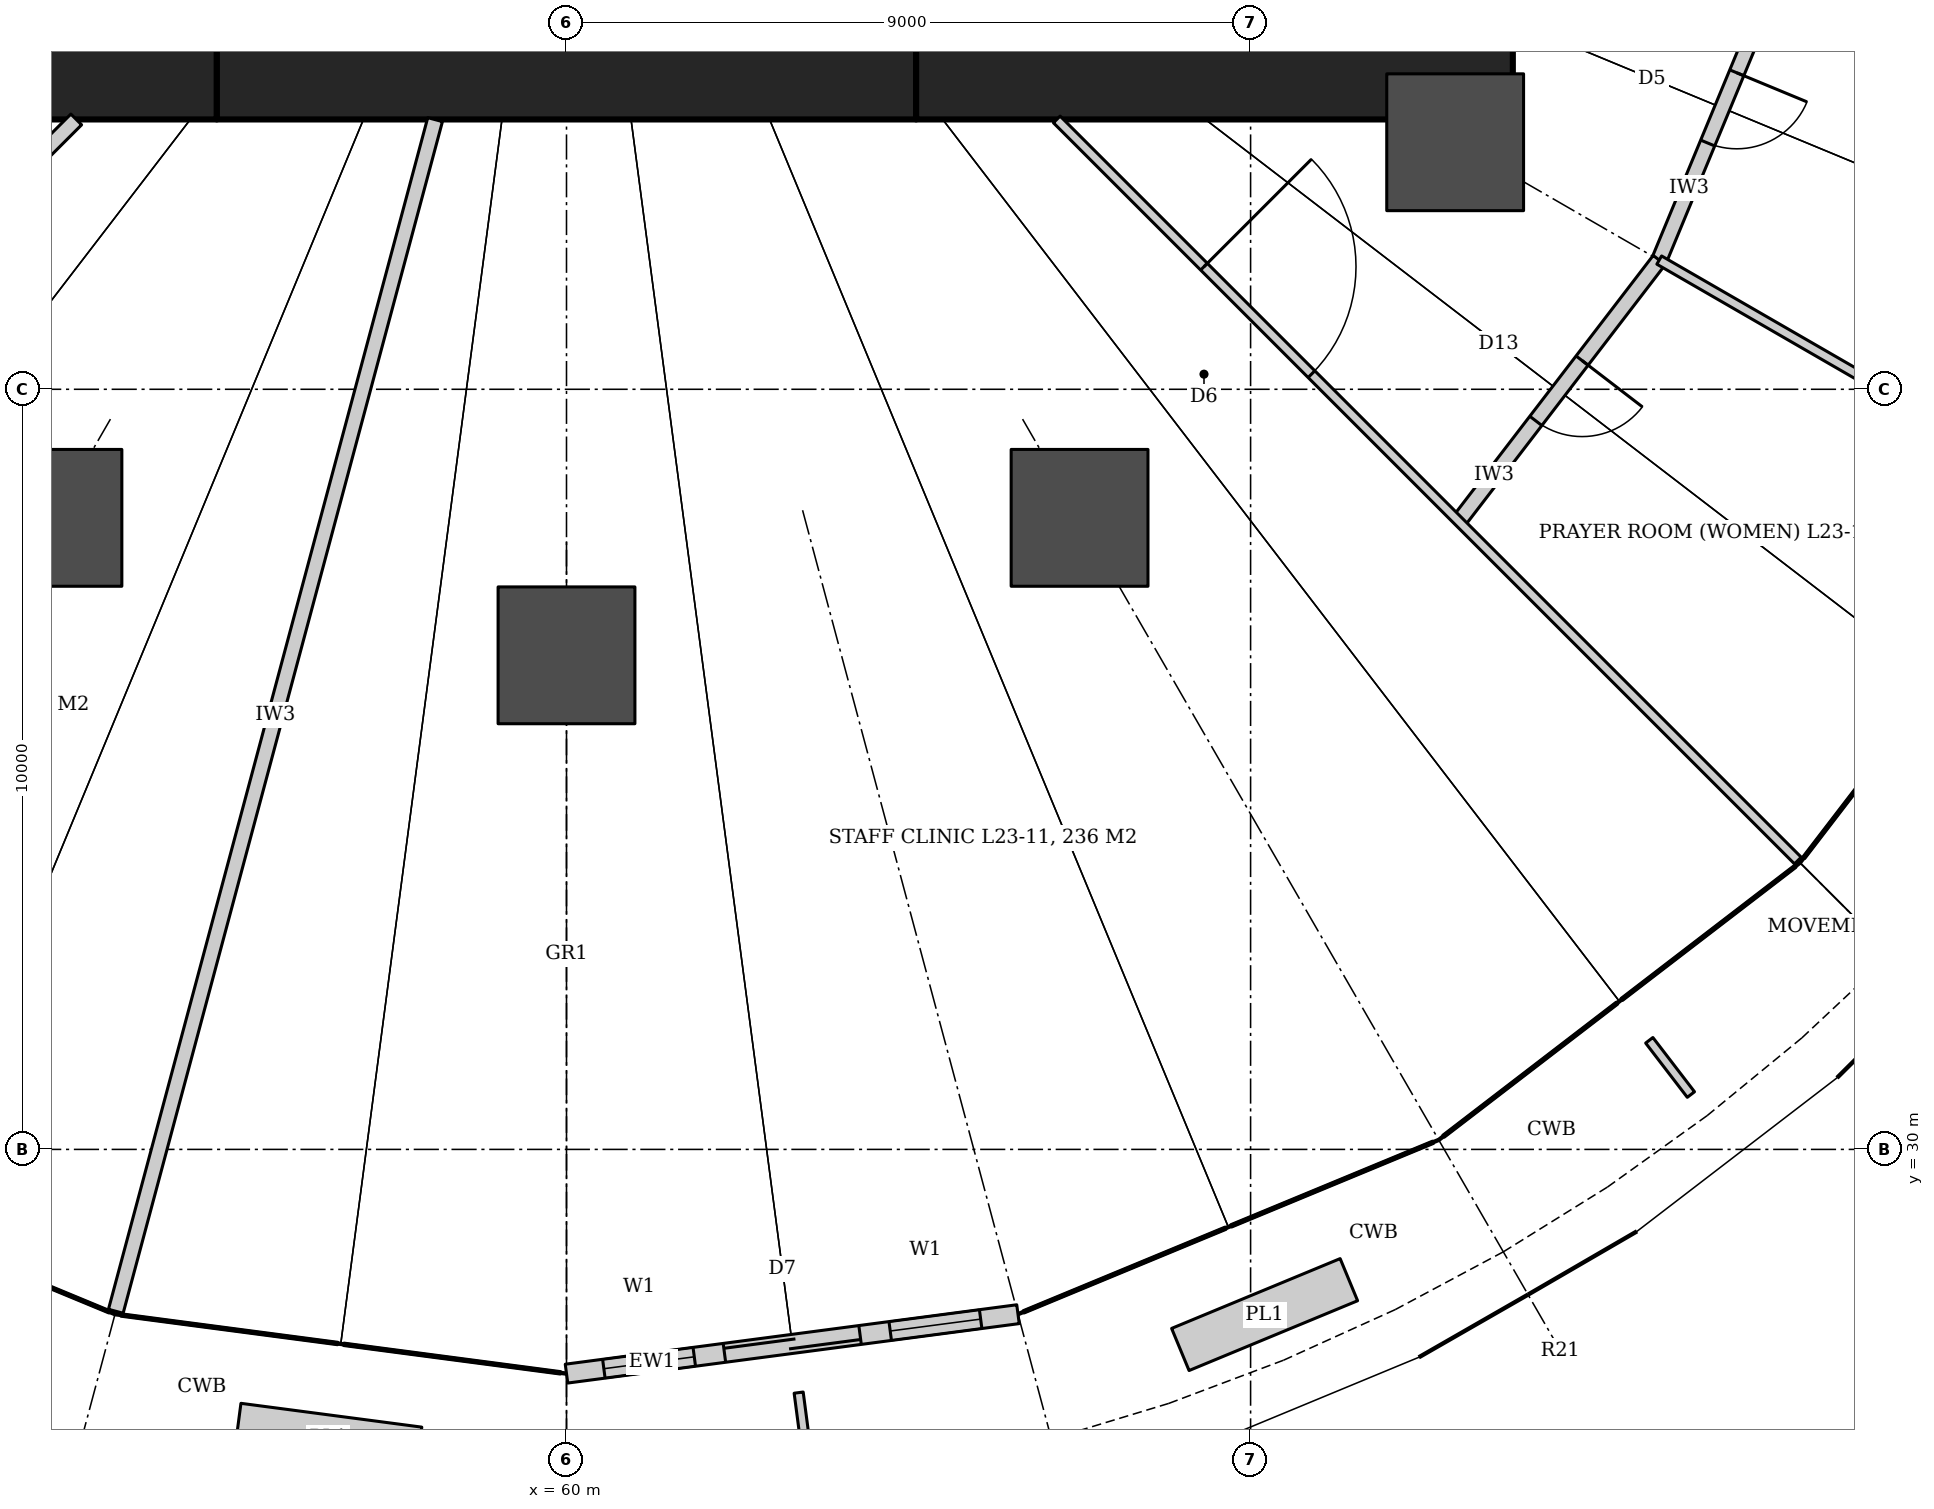
"""IFC4 building model, lengths in metres.
Left out: names, types, materials, properties, quantities, classifications, styles, units other than length and angle.
Written with IfcOpenShell. Run it as: python <this file> out.ifc"""

import sys

from ifc_helpers import new_model, si_unit, direction, frame, frame_2d, origin, origin_2d, place, context, subcontext, project, spatial, rectangle, hollow_circle, extrude, element, fill, save


model = new_model("IFC4")
c1 = context("Model", 3, precision=1e-05, world=origin(), true_north=direction((0.0, 1.0)))
c2 = subcontext(c1, "Body", "Model", "MODEL_VIEW")
j1 = project(units=[si_unit("LENGTHUNIT", "METRE"), si_unit("PLANEANGLEUNIT", "RADIAN")], contexts=[c1])
p1 = place(None, origin())
s1 = spatial("IfcSite", under=j1, at=p1, CompositionType="ELEMENT")
p2 = place(p1, origin())
s2 = spatial("IfcBuilding", under=s1, at=p2, CompositionType="ELEMENT")
p3 = place(p2, frame((0.0, 0.0, 105.8)))
s3 = spatial("IfcBuildingStorey", under=s2, at=p3, CompositionType="ELEMENT", Elevation=105.8)
p4 = place(p3, frame((47.55, 44.45, 0.0), z_axis=(0.0, 0.0, 1.0), x_axis=(1.0, 0.0, 0.0)))
e1 = element("IfcWall", 1, at=p4, inside=s3, PredefinedType="SHEAR", context=c2, shape_type="SweptSolid", body=[
    extrude(rectangle(XDim=7.85, YDim=1.8, at=frame_2d((3.925, 0.0))), origin(), (0.0, 0.0, 1.0), 4.2),
])
p5 = place(p3, frame((55.4, 44.45, 0.0), z_axis=(0.0, 0.0, 1.0), x_axis=(1.0, 0.0, 0.0)))
e2 = element("IfcWall", 2, at=p5, inside=s3, PredefinedType="SHEAR", context=c2, shape_type="SweptSolid", body=[
    extrude(rectangle(XDim=9.2, YDim=1.8, at=frame_2d((4.6, 0.0))), origin(), (0.0, 0.0, 1.0), 4.2),
])
p6 = place(p3, frame((64.6, 44.45, 0.0), z_axis=(0.0, 0.0, 1.0), x_axis=(1.0, 0.0, 0.0)))
e3 = element("IfcWall", 3, at=p6, inside=s3, PredefinedType="SHEAR", context=c2, shape_type="SweptSolid", body=[
    extrude(rectangle(XDim=7.85, YDim=1.8, at=frame_2d((3.925, 0.0))), origin(), (0.0, 0.0, 1.0), 4.2),
])
for number, where, z_axis, x_axis in (
    (4, (53.25, 38.309, 0.0), (0.0, 0.0, 1.0), (1.0, 0.0, 0.0)),
    (5, (60.0, 36.5, 0.0), (0.0, 0.0, 1.0), (1.0, 0.0, 0.0)),
    (6, (66.75, 38.309, 0.0), (0.0, 0.0, 1.0), (1.0, 0.0, 0.0)),
    (7, (71.691, 43.25, 0.0), (0.0, 0.0, 1.0), (1.0, 0.0, 0.0)),
):
    element("IfcColumn", number, at=place(p3, frame(where, z_axis=z_axis, x_axis=x_axis)), inside=s3, PredefinedType="COLUMN", context=c2, shape_type="SweptSolid", body=[
        extrude(hollow_circle(Radius=0.9, WallThickness=0.09, at=origin_2d()), origin(), (0.0, 0.0, 1.0), 4.2),
    ])
p7 = place(p3, frame((76.034, 45.704, 0.0), z_axis=(0.0, 0.0, 1.0), x_axis=(-0.382698425325, -0.923873322082, 0.0)))
e8 = element("IfcWall", 8, at=p7, inside=s3, PredefinedType="PARTITIONING", context=c2, shape_type="SweptSolid", body=[
    extrude(rectangle(XDim=4.333, YDim=0.2, at=frame_2d((2.167, 0.0))), origin(), (0.0, 0.0, 1.0), 3.04),
])
p8 = place(p7, frame((1.667, 0.0, 0.0)))
e9 = element("IfcOpeningElement", 9, at=p8, cuts=e8, PredefinedType="OPENING", context=c2, shape_type="SweptSolid", body=[
    extrude(rectangle(XDim=1.0, YDim=2.1, at=frame_2d((0.5, 1.05))), frame((0.0, 0.11, 0.0), z_axis=(0.0, -1.0, 0.0), x_axis=(1.0, 0.0, 0.0)), (0.0, 0.0, 1.0), 0.22),
])
p9 = place(p3, frame((74.376, 41.7, 0.0), z_axis=(0.0, 0.0, 1.0), x_axis=(-0.60874374674, -0.79336690806, 0.0)))
e10 = element("IfcWall", 10, at=p9, inside=s3, PredefinedType="PARTITIONING", context=c2, shape_type="SweptSolid", body=[
    extrude(rectangle(XDim=4.333, YDim=0.2, at=frame_2d((2.167, 0.0))), origin(), (0.0, 0.0, 1.0), 3.04),
])
p10 = place(p9, frame((1.667, 0.0, 0.0)))
e11 = element("IfcOpeningElement", 11, at=p10, cuts=e10, PredefinedType="OPENING", context=c2, shape_type="SweptSolid", body=[
    extrude(rectangle(XDim=1.0, YDim=2.4, at=frame_2d((0.5, 1.2))), frame((0.0, 0.11, 0.0), z_axis=(0.0, -1.0, 0.0), x_axis=(1.0, 0.0, 0.0)), (0.0, 0.0, 1.0), 0.22),
])
p11 = place(p3, frame((53.55, 43.55, 0.0), z_axis=(0.0, 0.0, 1.0), x_axis=(-0.707106781187, -0.707106781187, 0.0)))
e12 = element("IfcWall", 12, at=p11, inside=s3, PredefinedType="PARTITIONING", context=c2, shape_type="SweptSolid", body=[
    extrude(rectangle(XDim=13.788, YDim=0.2, at=frame_2d((6.894, 0.0))), origin(), (0.0, 0.0, 1.0), 3.02),
])
p12 = place(p11, frame((3.239, 0.0, 0.0)))
e13 = element("IfcOpeningElement", 13, at=p12, cuts=e12, PredefinedType="OPENING", context=c2, shape_type="SweptSolid", body=[
    extrude(rectangle(XDim=1.0, YDim=2.1, at=frame_2d((0.5, 1.05))), frame((0.0, 0.11, 0.0), z_axis=(0.0, -1.0, 0.0), x_axis=(1.0, 0.0, 0.0)), (0.0, 0.0, 1.0), 0.22),
])
p13 = place(p3, frame((58.271, 43.548, 0.0), z_axis=(0.0, 0.0, 1.0), x_axis=(-0.258807515492, -0.965928915565, 0.0)))
e14 = element("IfcWall", 14, at=p13, inside=s3, PredefinedType="PARTITIONING", context=c2, shape_type="SweptSolid", body=[
    extrude(rectangle(XDim=16.23, YDim=0.2, at=frame_2d((8.115, 0.0))), origin(), (0.0, 0.0, 1.0), 3.02),
])
p14 = place(p3, frame((66.45, 43.55, 0.0), z_axis=(0.0, 0.0, 1.0), x_axis=(0.707106781187, -0.707106781187, 0.0)))
e15 = element("IfcWall", 15, at=p14, inside=s3, PredefinedType="PARTITIONING", context=c2, shape_type="SweptSolid", body=[
    extrude(rectangle(XDim=13.788, YDim=0.125, at=frame_2d((6.894, 0.0))), origin(), (0.0, 0.0, 1.0), 3.02),
])
p15 = place(p14, frame((2.739, 0.0, 0.0)))
e16 = element("IfcOpeningElement", 16, at=p15, cuts=e15, PredefinedType="OPENING", context=c2, shape_type="SweptSolid", body=[
    extrude(rectangle(XDim=2.0, YDim=2.1, at=frame_2d((1.0, 1.05))), frame((0.0, 0.073, 0.0), z_axis=(0.0, -1.0, 0.0), x_axis=(1.0, 0.0, 0.0)), (0.0, 0.0, 1.0), 0.145),
])
p16 = place(p3, frame((74.376, 41.7, 0.0), z_axis=(0.0, 0.0, 1.0), x_axis=(0.866022573651, -0.500004901903, 0.0)))
e17 = element("IfcWall", 17, at=p16, inside=s3, PredefinedType="PARTITIONING", context=c2, shape_type="SweptSolid", body=[
    extrude(rectangle(XDim=6.31, YDim=0.125, at=frame_2d((3.155, 0.0))), origin(), (0.0, 0.0, 1.0), 3.04),
])
p17 = place(p3, frame((60.0, 27.05, 0.0), z_axis=(0.0, 0.0, 1.0), x_axis=(0.991445416479, 0.130521975708, 0.0)))
e18 = element("IfcWall", 18, at=p17, inside=s3, PredefinedType="SOLIDWALL", context=c2, shape_type="SweptSolid", body=[
    extrude(rectangle(XDim=5.991, YDim=0.25, at=frame_2d((2.996, 0.0))), origin(), (0.0, 0.0, 1.0), 4.04),
])
p18 = place(p17, frame((2.095, 0.0, 0.0)))
e19 = element("IfcOpeningElement", 19, at=p18, cuts=e18, PredefinedType="OPENING", context=c2, shape_type="SweptSolid", body=[
    extrude(rectangle(XDim=1.8, YDim=2.4, at=frame_2d((0.9, 1.2))), frame((0.0, 0.135, 0.0), z_axis=(0.0, -1.0, 0.0), x_axis=(1.0, 0.0, 0.0)), (0.0, 0.0, 1.0), 0.27),
])
p19 = place(p17, frame((0.496, 0.0, 0.0)))
e20 = element("IfcOpeningElement", 20, at=p19, cuts=e18, PredefinedType="OPENING", context=c2, shape_type="SweptSolid", body=[
    extrude(rectangle(XDim=1.2, YDim=2.4, at=frame_2d((0.6, 1.2))), frame((0.0, 0.135, 0.0), z_axis=(0.0, -1.0, 0.0), x_axis=(1.0, 0.0, 0.0)), (0.0, 0.0, 1.0), 0.27),
])
p20 = place(p17, frame((4.296, 0.0, 0.0)))
e21 = element("IfcOpeningElement", 21, at=p20, cuts=e18, PredefinedType="OPENING", context=c2, shape_type="SweptSolid", body=[
    extrude(rectangle(XDim=1.2, YDim=2.4, at=frame_2d((0.6, 1.2))), frame((0.0, 0.135, 0.0), z_axis=(0.0, -1.0, 0.0), x_axis=(1.0, 0.0, 0.0)), (0.0, 0.0, 1.0), 0.27),
])
p21 = place(p15, origin())
e22 = element("IfcDoor", 22, at=p21, inside=s3, OperationType="DOUBLE_DOOR_DOUBLE_SWING", PredefinedType="DOOR", context=c2, shape_type="SweptSolid", body=[
    extrude(rectangle(XDim=2.0, YDim=2.1, at=frame_2d((1.0, 1.05))), frame((0.0, 0.025, 0.0), z_axis=(0.0, -1.0, 0.0), x_axis=(1.0, 0.0, 0.0)), (0.0, 0.0, 1.0), 0.05),
])
fill(e16, e22)
p22 = place(p10, origin())
e23 = element("IfcDoor", 23, at=p22, inside=s3, OperationType="SINGLE_SWING_LEFT", PredefinedType="DOOR", context=c2, shape_type="SweptSolid", body=[
    extrude(rectangle(XDim=1.0, YDim=2.4, at=frame_2d((0.5, 1.2))), frame((0.0, 0.025, 0.0), z_axis=(0.0, -1.0, 0.0), x_axis=(1.0, 0.0, 0.0)), (0.0, 0.0, 1.0), 0.05),
])
fill(e11, e23)
p23 = place(p8, origin())
e24 = element("IfcDoor", 24, at=p23, inside=s3, OperationType="SINGLE_SWING_LEFT", PredefinedType="DOOR", context=c2, shape_type="SweptSolid", body=[
    extrude(rectangle(XDim=1.0, YDim=2.1, at=frame_2d((0.5, 1.05))), frame((0.0, 0.025, 0.0), z_axis=(0.0, -1.0, 0.0), x_axis=(1.0, 0.0, 0.0)), (0.0, 0.0, 1.0), 0.05),
])
fill(e9, e24)
p24 = place(p18, origin())
e25 = element("IfcDoor", 25, at=p24, inside=s3, OperationType="DOUBLE_DOOR_SLIDING", PredefinedType="DOOR", context=c2, shape_type="SweptSolid", body=[
    extrude(rectangle(XDim=1.8, YDim=2.4, at=frame_2d((0.9, 1.2))), frame((0.0, 0.025, 0.0), z_axis=(0.0, -1.0, 0.0), x_axis=(1.0, 0.0, 0.0)), (0.0, 0.0, 1.0), 0.05),
])
fill(e19, e25)
p25 = place(p19, origin())
e26 = element("IfcWindow", 26, at=p25, inside=s3, PartitioningType="SINGLE_PANEL", PredefinedType="WINDOW", context=c2, shape_type="SweptSolid", body=[
    extrude(rectangle(XDim=1.2, YDim=2.4, at=frame_2d((0.6, 1.2))), frame((0.0, 0.03, 0.0), z_axis=(0.0, -1.0, 0.0), x_axis=(1.0, 0.0, 0.0)), (0.0, 0.0, 1.0), 0.06),
])
fill(e20, e26)
p26 = place(p20, origin())
e27 = element("IfcWindow", 27, at=p26, inside=s3, PartitioningType="SINGLE_PANEL", PredefinedType="WINDOW", context=c2, shape_type="SweptSolid", body=[
    extrude(rectangle(XDim=1.2, YDim=2.4, at=frame_2d((0.6, 1.2))), frame((0.0, 0.03, 0.0), z_axis=(0.0, -1.0, 0.0), x_axis=(1.0, 0.0, 0.0)), (0.0, 0.0, 1.0), 0.06),
])
fill(e21, e27)
save(model, sys.argv[1])
